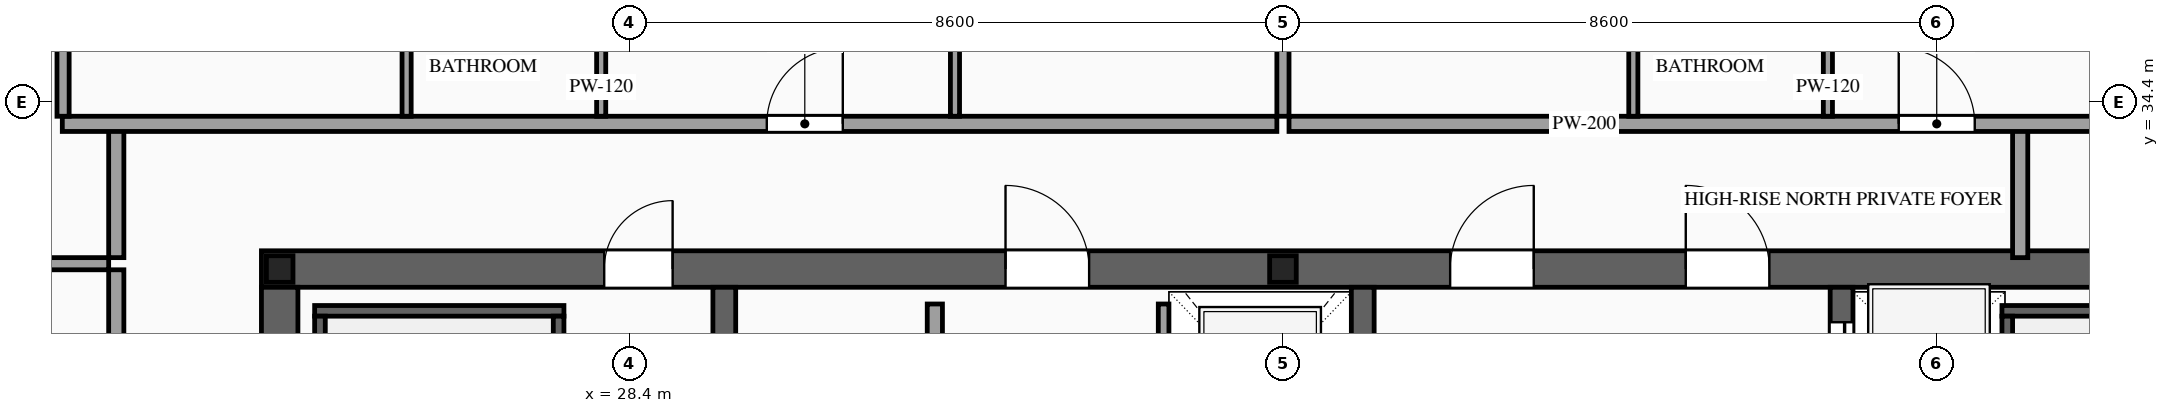
"""IFC4 building model, lengths in metres.
Left out: names, types, materials, properties, quantities, classifications, styles, units other than length and angle.
Written with IfcOpenShell. Run it as: python <this file> out.ifc"""

import sys

from ifc_helpers import new_model, si_unit, direction, frame, frame_2d, origin, origin_2d, place, context, subcontext, project, spatial, rectangle, i_section, extrude, source, transform, mapped, element, fill, save


model = new_model("IFC4")
c1 = context("Model", 3, precision=1e-05, world=origin(), true_north=direction((0.0, 1.0)))
c2 = subcontext(c1, "Body", "Model", "MODEL_VIEW")
j1 = project(units=[si_unit("LENGTHUNIT", "METRE"), si_unit("PLANEANGLEUNIT", "RADIAN")], contexts=[c1])
p1 = place(None, origin())
s1 = spatial("IfcSite", under=j1, at=p1, CompositionType="ELEMENT")
p2 = place(p1, origin())
s2 = spatial("IfcBuilding", under=s1, at=p2, CompositionType="ELEMENT")
p3 = place(p2, frame((0.0, 0.0, 296.1)))
s3 = spatial("IfcBuildingStorey", under=s2, at=p3, CompositionType="ELEMENT", Elevation=296.1)
p4 = place(p3, frame((23.56, 32.2, 0.0), z_axis=(0.0, 0.0, 1.0), x_axis=(1.0, 0.0, 0.0)))
e1 = element("IfcWall", 1, at=p4, inside=s3, PredefinedType="SHEAR", context=c2, shape_type="SweptSolid", body=[
    extrude(rectangle(XDim=26.88, YDim=0.48, at=frame_2d((13.44, 0.0))), origin(), (0.0, 0.0, 1.0), 3.5),
])
p5 = place(p4, frame((4.51, 0.0, 0.0)))
e2 = element("IfcOpeningElement", 2, at=p5, cuts=e1, PredefinedType="OPENING", context=c2, shape_type="SweptSolid", body=[
    extrude(rectangle(XDim=0.9, YDim=2.15, at=frame_2d((0.45, 1.075))), frame((0.0, 0.255, 0.0), z_axis=(0.0, -1.0, 0.0), x_axis=(1.0, 0.0, 0.0)), (0.0, 0.0, 1.0), 0.51),
])
p6 = place(p4, frame((9.79, 0.0, 0.0)))
e3 = element("IfcOpeningElement", 3, at=p6, cuts=e1, PredefinedType="OPENING", context=c2, shape_type="SweptSolid", body=[
    extrude(rectangle(XDim=1.1, YDim=2.2, at=frame_2d((0.55, 1.1))), frame((0.0, 0.255, 0.0), z_axis=(0.0, -1.0, 0.0), x_axis=(1.0, 0.0, 0.0)), (0.0, 0.0, 1.0), 0.51),
])
p7 = place(p4, frame((15.64, 0.0, 0.0)))
e4 = element("IfcOpeningElement", 4, at=p7, cuts=e1, PredefinedType="OPENING", context=c2, shape_type="SweptSolid", body=[
    extrude(rectangle(XDim=1.1, YDim=2.2, at=frame_2d((0.55, 1.1))), frame((0.0, 0.255, 0.0), z_axis=(0.0, -1.0, 0.0), x_axis=(1.0, 0.0, 0.0)), (0.0, 0.0, 1.0), 0.51),
])
p8 = place(p4, frame((18.74, 0.0, 0.0)))
e5 = element("IfcOpeningElement", 5, at=p8, cuts=e1, PredefinedType="OPENING", context=c2, shape_type="SweptSolid", body=[
    extrude(rectangle(XDim=1.1, YDim=2.2, at=frame_2d((0.55, 1.1))), frame((0.0, 0.255, 0.0), z_axis=(0.0, -1.0, 0.0), x_axis=(1.0, 0.0, 0.0)), (0.0, 0.0, 1.0), 0.51),
])
m1 = source(origin(), c2, "Body", "SweptSolid", [
    extrude(rectangle(XDim=12.32, YDim=0.48, at=frame_2d((6.16, 0.0))), origin(), (0.0, 0.0, 1.0), 3.5),
])
p9 = place(p3, frame((23.8, 19.64, 0.0), z_axis=(0.0, 0.0, 1.0), x_axis=(0.0, 1.0, 0.0)))
e6 = element("IfcWall", 6, at=p9, inside=s3, PredefinedType="SHEAR", context=c2, shape_type="MappedRepresentation", body=[
    mapped(m1, transform((0.0, 0.0, 0.0), scale=1.0)),
])
m2 = source(origin(), c2, "Body", "SweptSolid", [
    extrude(rectangle(XDim=12.32, YDim=0.3, at=frame_2d((6.16, 0.0))), origin(), (0.0, 0.0, 1.0), 3.5),
])
for number, where, z_axis, x_axis in (
    (7, (29.65, 19.64, 0.0), (0.0, 0.0, 1.0), (0.0, 1.0, 0.0)),
    (8, (38.05, 19.64, 0.0), (0.0, 0.0, 1.0), (0.0, 1.0, 0.0)),
):
    element("IfcWall", number, at=place(p3, frame(where, z_axis=z_axis, x_axis=x_axis)), inside=s3, PredefinedType="SOLIDWALL", context=c2, shape_type="MappedRepresentation", body=[
        mapped(m2, transform((0.0, 0.0, 0.0), scale=1.0)),
    ])
p10 = place(p3, frame((44.35, 19.64, 0.0), z_axis=(0.0, 0.0, 1.0), x_axis=(0.0, 1.0, 0.0)))
e9 = element("IfcWall", 9, at=p10, inside=s3, PredefinedType="SOLIDWALL", context=c2, shape_type="SweptSolid", body=[
    extrude(rectangle(XDim=12.32, YDim=0.3, at=frame_2d((6.16, 0.0))), origin(), (0.0, 0.0, 1.0), 3.5),
])
p11 = place(p10, frame((6.56, 0.0, 0.0)))
e10 = element("IfcOpeningElement", 10, at=p11, cuts=e9, PredefinedType="OPENING", context=c2, shape_type="SweptSolid", body=[
    extrude(rectangle(XDim=1.1, YDim=2.2, at=frame_2d((0.55, 1.1))), frame((0.0, 0.165, 0.0), z_axis=(0.0, -1.0, 0.0), x_axis=(1.0, 0.0, 0.0)), (0.0, 0.0, 1.0), 0.33),
])
p12 = place(p10, frame((8.66, 0.0, 0.0)))
e11 = element("IfcOpeningElement", 11, at=p12, cuts=e9, PredefinedType="OPENING", context=c2, shape_type="SweptSolid", body=[
    extrude(rectangle(XDim=1.1, YDim=2.2, at=frame_2d((0.55, 1.1))), frame((0.0, 0.165, 0.0), z_axis=(0.0, -1.0, 0.0), x_axis=(1.0, 0.0, 0.0)), (0.0, 0.0, 1.0), 0.33),
])
p13 = place(p10, frame((10.76, 0.0, 0.0)))
e12 = element("IfcOpeningElement", 12, at=p13, cuts=e9, PredefinedType="OPENING", context=c2, shape_type="SweptSolid", body=[
    extrude(rectangle(XDim=1.1, YDim=2.2, at=frame_2d((0.55, 1.1))), frame((0.0, 0.165, 0.0), z_axis=(0.0, -1.0, 0.0), x_axis=(1.0, 0.0, 0.0)), (0.0, 0.0, 1.0), 0.33),
])
m3 = source(origin(), c2, "Body", "SweptSolid", [
    extrude(i_section(OverallWidth=0.35, OverallDepth=0.35, WebThickness=0.012, FlangeThickness=0.019, at=origin_2d()), origin(), (0.0, 0.0, 1.0), 3.5),
])
for number, where, z_axis, x_axis in (
    (13, (23.8, 32.2, 0.0), (0.0, 0.0, 1.0), (1.0, 0.0, 0.0)),
    (14, (37.0, 32.2, 0.0), (0.0, 0.0, 1.0), (1.0, 0.0, 0.0)),
):
    element("IfcColumn", number, at=place(p3, frame(where, z_axis=z_axis, x_axis=x_axis)), inside=s3, PredefinedType="COLUMN", context=c2, shape_type="MappedRepresentation", body=[
        mapped(m3, transform((0.0, 0.0, 0.0), scale=1.0)),
    ])
p14 = place(p3, frame((35.43, 29.4, 0.0), z_axis=(0.0, 0.0, 1.0), x_axis=(0.0, 1.0, 0.0)))
e15 = element("IfcWall", 15, at=p14, inside=s3, PredefinedType="SOLIDWALL", context=c2, shape_type="SweptSolid", body=[
    extrude(rectangle(XDim=2.34, YDim=0.14, at=frame_2d((1.17, 0.0))), origin(), (0.0, 0.0, 1.0), 3.28),
])
p15 = place(p14, frame((0.62, 0.0, 0.0)))
e16 = element("IfcOpeningElement", 16, at=p15, cuts=e15, PredefinedType="OPENING", context=c2, shape_type="SweptSolid", body=[
    extrude(rectangle(XDim=1.1, YDim=2.2, at=frame_2d((0.55, 1.1))), frame((0.0, 0.085, 0.0), z_axis=(0.0, -1.0, 0.0), x_axis=(1.0, 0.0, 0.0)), (0.0, 0.0, 1.0), 0.17),
])
m4 = source(origin(), c2, "Body", "SweptSolid", [
    extrude(rectangle(XDim=3.28, YDim=0.14, at=frame_2d((1.64, 0.0))), origin(), (0.0, 0.0, 1.0), 3.28),
])
p16 = place(p3, frame((24.26, 31.65, 0.0), z_axis=(0.0, 0.0, 1.0), x_axis=(1.0, 0.0, 0.0)))
e17 = element("IfcWall", 17, at=p16, inside=s3, PredefinedType="SOLIDWALL", context=c2, shape_type="MappedRepresentation", body=[
    mapped(m4, transform((0.0, 0.0, 0.0), scale=1.0)),
])
m5 = source(origin(), c2, "Body", "SweptSolid", [
    extrude(rectangle(XDim=8.94, YDim=0.14, at=frame_2d((4.47, 0.0))), origin(), (0.0, 0.0, 1.0), 3.28),
])
for number, where, z_axis, x_axis in (
    (18, (24.33, 22.64, 0.0), (0.0, 0.0, 1.0), (0.0, 1.0, 0.0)),
    (19, (27.47, 22.64, 0.0), (0.0, 0.0, 1.0), (0.0, 1.0, 0.0)),
):
    element("IfcWall", number, at=place(p3, frame(where, z_axis=z_axis, x_axis=x_axis)), inside=s3, PredefinedType="SOLIDWALL", context=c2, shape_type="MappedRepresentation", body=[
        mapped(m5, transform((0.0, 0.0, 0.0), scale=1.0)),
    ])
p17 = place(p3, frame((46.46, 31.65, 0.0), z_axis=(0.0, 0.0, 1.0), x_axis=(1.0, 0.0, 0.0)))
e20 = element("IfcWall", 20, at=p17, inside=s3, PredefinedType="SOLIDWALL", context=c2, shape_type="MappedRepresentation", body=[
    mapped(m4, transform((0.0, 0.0, 0.0), scale=1.0)),
])
p18 = place(p3, frame((46.53, 22.64, 0.0), z_axis=(0.0, 0.0, 1.0), x_axis=(0.0, 1.0, 0.0)))
e21 = element("IfcWall", 21, at=p18, inside=s3, PredefinedType="SOLIDWALL", context=c2, shape_type="MappedRepresentation", body=[
    mapped(m5, transform((0.0, 0.0, 0.0), scale=1.0)),
])
p19 = place(p3, frame((32.42, 25.92, 0.0), z_axis=(0.0, 0.0, 1.0), x_axis=(0.0, 1.0, 0.0)))
e22 = element("IfcWall", 22, at=p19, inside=s3, PredefinedType="PARTITIONING", context=c2, shape_type="SweptSolid", body=[
    extrude(rectangle(XDim=5.82, YDim=0.2, at=frame_2d((2.91, 0.0))), origin(), (0.0, 0.0, 1.0), 3.28),
])
p20 = place(p19, frame((2.46, 0.0, 0.0)))
e23 = element("IfcOpeningElement", 23, at=p20, cuts=e22, PredefinedType="OPENING", context=c2, shape_type="SweptSolid", body=[
    extrude(rectangle(XDim=0.9, YDim=2.15, at=frame_2d((0.45, 1.075))), frame((0.0, 0.115, 0.0), z_axis=(0.0, -1.0, 0.0), x_axis=(1.0, 0.0, 0.0)), (0.0, 0.0, 1.0), 0.23),
])
m6 = source(origin(), c2, "Body", "SweptSolid", [
    extrude(rectangle(XDim=1.7, YDim=0.2, at=frame_2d((0.85, 0.0))), origin(), (0.0, 0.0, 1.0), 3.28),
])
for number, where, z_axis, x_axis in (
    (24, (21.65, 32.35, 0.0), (0.0, 0.0, 1.0), (0.0, 1.0, 0.0)),
    (25, (46.7, 32.35, 0.0), (0.0, 0.0, 1.0), (0.0, 1.0, 0.0)),
):
    element("IfcWall", number, at=place(p3, frame(where, z_axis=z_axis, x_axis=x_axis)), inside=s3, PredefinedType="PARTITIONING", context=c2, shape_type="MappedRepresentation", body=[
        mapped(m6, transform((0.0, 0.0, 0.0), scale=1.0)),
    ])
p21 = place(p3, frame((20.94, 34.11, 0.0), z_axis=(0.0, 0.0, 1.0), x_axis=(1.0, 0.0, 0.0)))
e26 = element("IfcWall", 26, at=p21, inside=s3, PredefinedType="PARTITIONING", context=c2, shape_type="SweptSolid", body=[
    extrude(rectangle(XDim=15.98, YDim=0.2, at=frame_2d((7.99, 0.0))), origin(), (0.0, 0.0, 1.0), 3.28),
])
p22 = place(p21, frame((9.269, 0.0, 0.0)))
e27 = element("IfcOpeningElement", 27, at=p22, cuts=e26, PredefinedType="OPENING", context=c2, shape_type="SweptSolid", body=[
    extrude(rectangle(XDim=1.0, YDim=2.2, at=frame_2d((0.5, 1.1))), frame((0.0, 0.115, 0.0), z_axis=(0.0, -1.0, 0.0), x_axis=(1.0, 0.0, 0.0)), (0.0, 0.0, 1.0), 0.23),
])
m7 = source(origin(), c2, "Body", "SweptSolid", [
    extrude(rectangle(XDim=10.54, YDim=0.16, at=frame_2d((5.27, 0.0))), origin(), (0.0, 0.0, 1.0), 2.787),
])
p23 = place(p3, frame((37.0, 34.21, 0.0), z_axis=(0.0, 0.0, 1.0), x_axis=(0.0, 1.0, 0.0)))
e28 = element("IfcWall", 28, at=p23, inside=s3, PredefinedType="PARTITIONING", context=c2, shape_type="MappedRepresentation", body=[
    mapped(m7, transform((0.0, 0.0, 0.0), scale=1.0)),
])
m8 = source(origin(), c2, "Body", "SweptSolid", [
    extrude(rectangle(XDim=2.9, YDim=0.12, at=frame_2d((1.45, 0.0))), origin(), (0.0, 0.0, 1.0), 3.28),
])
p24 = place(p3, frame((25.47, 34.21, 0.0), z_axis=(0.0, 0.0, 1.0), x_axis=(0.0, 1.0, 0.0)))
e29 = element("IfcWall", 29, at=p24, inside=s3, PredefinedType="PARTITIONING", context=c2, shape_type="MappedRepresentation", body=[
    mapped(m8, transform((0.0, 0.0, 0.0), scale=1.0)),
])
p25 = place(p3, frame((28.03, 34.21, 0.0), z_axis=(0.0, 0.0, 1.0), x_axis=(0.0, 1.0, 0.0)))
e30 = element("IfcWall", 30, at=p25, inside=s3, PredefinedType="PARTITIONING", context=c2, shape_type="SweptSolid", body=[
    extrude(rectangle(XDim=2.9, YDim=0.12, at=frame_2d((1.45, 0.0))), origin(), (0.0, 0.0, 1.0), 3.28),
])
p26 = place(p25, frame((1.025, 0.0, 0.0)))
e31 = element("IfcOpeningElement", 31, at=p26, cuts=e30, PredefinedType="OPENING", context=c2, shape_type="SweptSolid", body=[
    extrude(rectangle(XDim=0.85, YDim=2.1, at=frame_2d((0.425, 1.05))), frame((0.0, 0.075, 0.0), z_axis=(0.0, -1.0, 0.0), x_axis=(1.0, 0.0, 0.0)), (0.0, 0.0, 1.0), 0.15),
])
p27 = place(p3, frame((32.685, 34.21, 0.0), z_axis=(0.0, 0.0, 1.0), x_axis=(0.0, 1.0, 0.0)))
e32 = element("IfcWall", 32, at=p27, inside=s3, PredefinedType="PARTITIONING", context=c2, shape_type="MappedRepresentation", body=[
    mapped(m8, transform((0.0, 0.0, 0.0), scale=1.0)),
])
p28 = place(p3, frame((37.08, 34.11, 0.0), z_axis=(0.0, 0.0, 1.0), x_axis=(1.0, 0.0, 0.0)))
e33 = element("IfcWall", 33, at=p28, inside=s3, PredefinedType="PARTITIONING", context=c2, shape_type="SweptSolid", body=[
    extrude(rectangle(XDim=15.98, YDim=0.2, at=frame_2d((7.99, 0.0))), origin(), (0.0, 0.0, 1.0), 3.28),
])
p29 = place(p28, frame((8.022, 0.0, 0.0)))
e34 = element("IfcOpeningElement", 34, at=p29, cuts=e33, PredefinedType="OPENING", context=c2, shape_type="SweptSolid", body=[
    extrude(rectangle(XDim=1.0, YDim=2.2, at=frame_2d((0.5, 1.1))), frame((0.0, 0.115, 0.0), z_axis=(0.0, -1.0, 0.0), x_axis=(1.0, 0.0, 0.0)), (0.0, 0.0, 1.0), 0.23),
])
m9 = source(origin(), c2, "Body", "SweptSolid", [
    extrude(rectangle(XDim=10.39, YDim=0.16, at=frame_2d((5.195, 0.0))), origin(), (0.0, 0.0, 1.0), 3.28),
])
p30 = place(p3, frame((20.95, 34.21, 0.0), z_axis=(0.0, 0.0, 1.0), x_axis=(0.0, 1.0, 0.0)))
e35 = element("IfcWall", 35, at=p30, inside=s3, PredefinedType="PARTITIONING", context=c2, shape_type="MappedRepresentation", body=[
    mapped(m9, transform((0.0, 0.0, 0.0), scale=1.0)),
])
p31 = place(p3, frame((41.61, 34.21, 0.0), z_axis=(0.0, 0.0, 1.0), x_axis=(0.0, 1.0, 0.0)))
e36 = element("IfcWall", 36, at=p31, inside=s3, PredefinedType="PARTITIONING", context=c2, shape_type="MappedRepresentation", body=[
    mapped(m8, transform((0.0, 0.0, 0.0), scale=1.0)),
])
p32 = place(p3, frame((44.17, 34.21, 0.0), z_axis=(0.0, 0.0, 1.0), x_axis=(0.0, 1.0, 0.0)))
e37 = element("IfcWall", 37, at=p32, inside=s3, PredefinedType="PARTITIONING", context=c2, shape_type="SweptSolid", body=[
    extrude(rectangle(XDim=2.9, YDim=0.12, at=frame_2d((1.45, 0.0))), origin(), (0.0, 0.0, 1.0), 3.28),
])
p33 = place(p32, frame((1.025, 0.0, 0.0)))
e38 = element("IfcOpeningElement", 38, at=p33, cuts=e37, PredefinedType="OPENING", context=c2, shape_type="SweptSolid", body=[
    extrude(rectangle(XDim=0.85, YDim=2.1, at=frame_2d((0.425, 1.05))), frame((0.0, 0.075, 0.0), z_axis=(0.0, -1.0, 0.0), x_axis=(1.0, 0.0, 0.0)), (0.0, 0.0, 1.0), 0.15),
])
p34 = place(p3, frame((21.65, 19.41, 0.0), z_axis=(0.0, 0.0, 1.0), x_axis=(0.0, 1.0, 0.0)))
e39 = element("IfcWall", 39, at=p34, inside=s3, PredefinedType="PARTITIONING", context=c2, shape_type="SweptSolid", body=[
    extrude(rectangle(XDim=12.78, YDim=0.2, at=frame_2d((6.39, 0.0))), origin(), (0.0, 0.0, 1.0), 3.28),
])
p35 = place(p34, frame((5.89, 0.0, 0.0)))
e40 = element("IfcOpeningElement", 40, at=p35, cuts=e39, PredefinedType="OPENING", context=c2, shape_type="SweptSolid", body=[
    extrude(rectangle(XDim=1.0, YDim=2.2, at=frame_2d((0.5, 1.1))), frame((0.0, 0.115, 0.0), z_axis=(0.0, -1.0, 0.0), x_axis=(1.0, 0.0, 0.0)), (0.0, 0.0, 1.0), 0.23),
])
m10 = source(origin(), c2, "Body", "SweptSolid", [
    extrude(rectangle(XDim=3.5, YDim=0.16, at=frame_2d((1.75, 0.0))), origin(), (0.0, 0.0, 1.0), 2.825),
])
p36 = place(p3, frame((18.05, 32.27, 0.0), z_axis=(0.0, 0.0, 1.0), x_axis=(1.0, 0.0, 0.0)))
e41 = element("IfcWall", 41, at=p36, inside=s3, PredefinedType="PARTITIONING", context=c2, shape_type="MappedRepresentation", body=[
    mapped(m10, transform((0.0, 0.0, 0.0), scale=1.0)),
])
m11 = source(origin(), c2, "Body", "SweptSolid", [
    extrude(rectangle(XDim=1.1, YDim=2.2, at=frame_2d((0.55, 1.1))), frame((0.0, 0.025, 0.0), z_axis=(0.0, -1.0, 0.0), x_axis=(1.0, 0.0, 0.0)), (0.0, 0.0, 1.0), 0.05),
])
p37 = place(p13, origin())
e42 = element("IfcDoor", 42, at=p37, inside=s3, OperationType="SLIDING_TO_LEFT", PredefinedType="DOOR", context=c2, shape_type="MappedRepresentation", body=[
    mapped(m11, transform((0.0, 0.0, 0.0), scale=1.0)),
])
fill(e12, e42)
m12 = source(origin(), c2, "Body", "SweptSolid", [
    extrude(rectangle(XDim=0.9, YDim=2.15, at=frame_2d((0.45, 1.075))), frame((0.0, 0.025, 0.0), z_axis=(0.0, -1.0, 0.0), x_axis=(1.0, 0.0, 0.0)), (0.0, 0.0, 1.0), 0.05),
])
p38 = place(p5, origin())
e43 = element("IfcDoor", 43, at=p38, inside=s3, OperationType="SINGLE_SWING_RIGHT", PredefinedType="DOOR", context=c2, shape_type="MappedRepresentation", body=[
    mapped(m12, transform((0.0, 0.0, 0.0), scale=1.0)),
])
fill(e2, e43)
m13 = source(origin(), c2, "Body", "SweptSolid", [
    extrude(rectangle(XDim=1.1, YDim=2.2, at=frame_2d((0.55, 1.1))), frame((0.0, 0.025, 0.0), z_axis=(0.0, -1.0, 0.0), x_axis=(1.0, 0.0, 0.0)), (0.0, 0.0, 1.0), 0.05),
])
p39 = place(p6, origin())
e44 = element("IfcDoor", 44, at=p39, inside=s3, OperationType="SINGLE_SWING_LEFT", PredefinedType="DOOR", context=c2, shape_type="MappedRepresentation", body=[
    mapped(m13, transform((0.0, 0.0, 0.0), scale=1.0)),
])
fill(e3, e44)
p40 = place(p7, origin())
e45 = element("IfcDoor", 45, at=p40, inside=s3, OperationType="SINGLE_SWING_RIGHT", PredefinedType="DOOR", context=c2, shape_type="MappedRepresentation", body=[
    mapped(m13, transform((0.0, 0.0, 0.0), scale=1.0)),
])
fill(e4, e45)
p41 = place(p8, origin())
e46 = element("IfcDoor", 46, at=p41, inside=s3, OperationType="SINGLE_SWING_LEFT", PredefinedType="DOOR", context=c2, shape_type="MappedRepresentation", body=[
    mapped(m13, transform((0.0, 0.0, 0.0), scale=1.0)),
])
fill(e5, e46)
m14 = source(origin(), c2, "Body", "SweptSolid", [
    extrude(rectangle(XDim=1.0, YDim=2.2, at=frame_2d((0.5, 1.1))), frame((0.0, 0.025, 0.0), z_axis=(0.0, -1.0, 0.0), x_axis=(1.0, 0.0, 0.0)), (0.0, 0.0, 1.0), 0.05),
])
p42 = place(p22, origin())
e47 = element("IfcDoor", 47, at=p42, inside=s3, OperationType="SINGLE_SWING_RIGHT", PredefinedType="DOOR", context=c2, shape_type="MappedRepresentation", body=[
    mapped(m14, transform((0.0, 0.0, 0.0), scale=1.0)),
])
fill(e27, e47)
p43 = place(p29, origin())
e48 = element("IfcDoor", 48, at=p43, inside=s3, OperationType="SINGLE_SWING_LEFT", PredefinedType="DOOR", context=c2, shape_type="MappedRepresentation", body=[
    mapped(m14, transform((0.0, 0.0, 0.0), scale=1.0)),
])
fill(e34, e48)
save(model, sys.argv[1])
